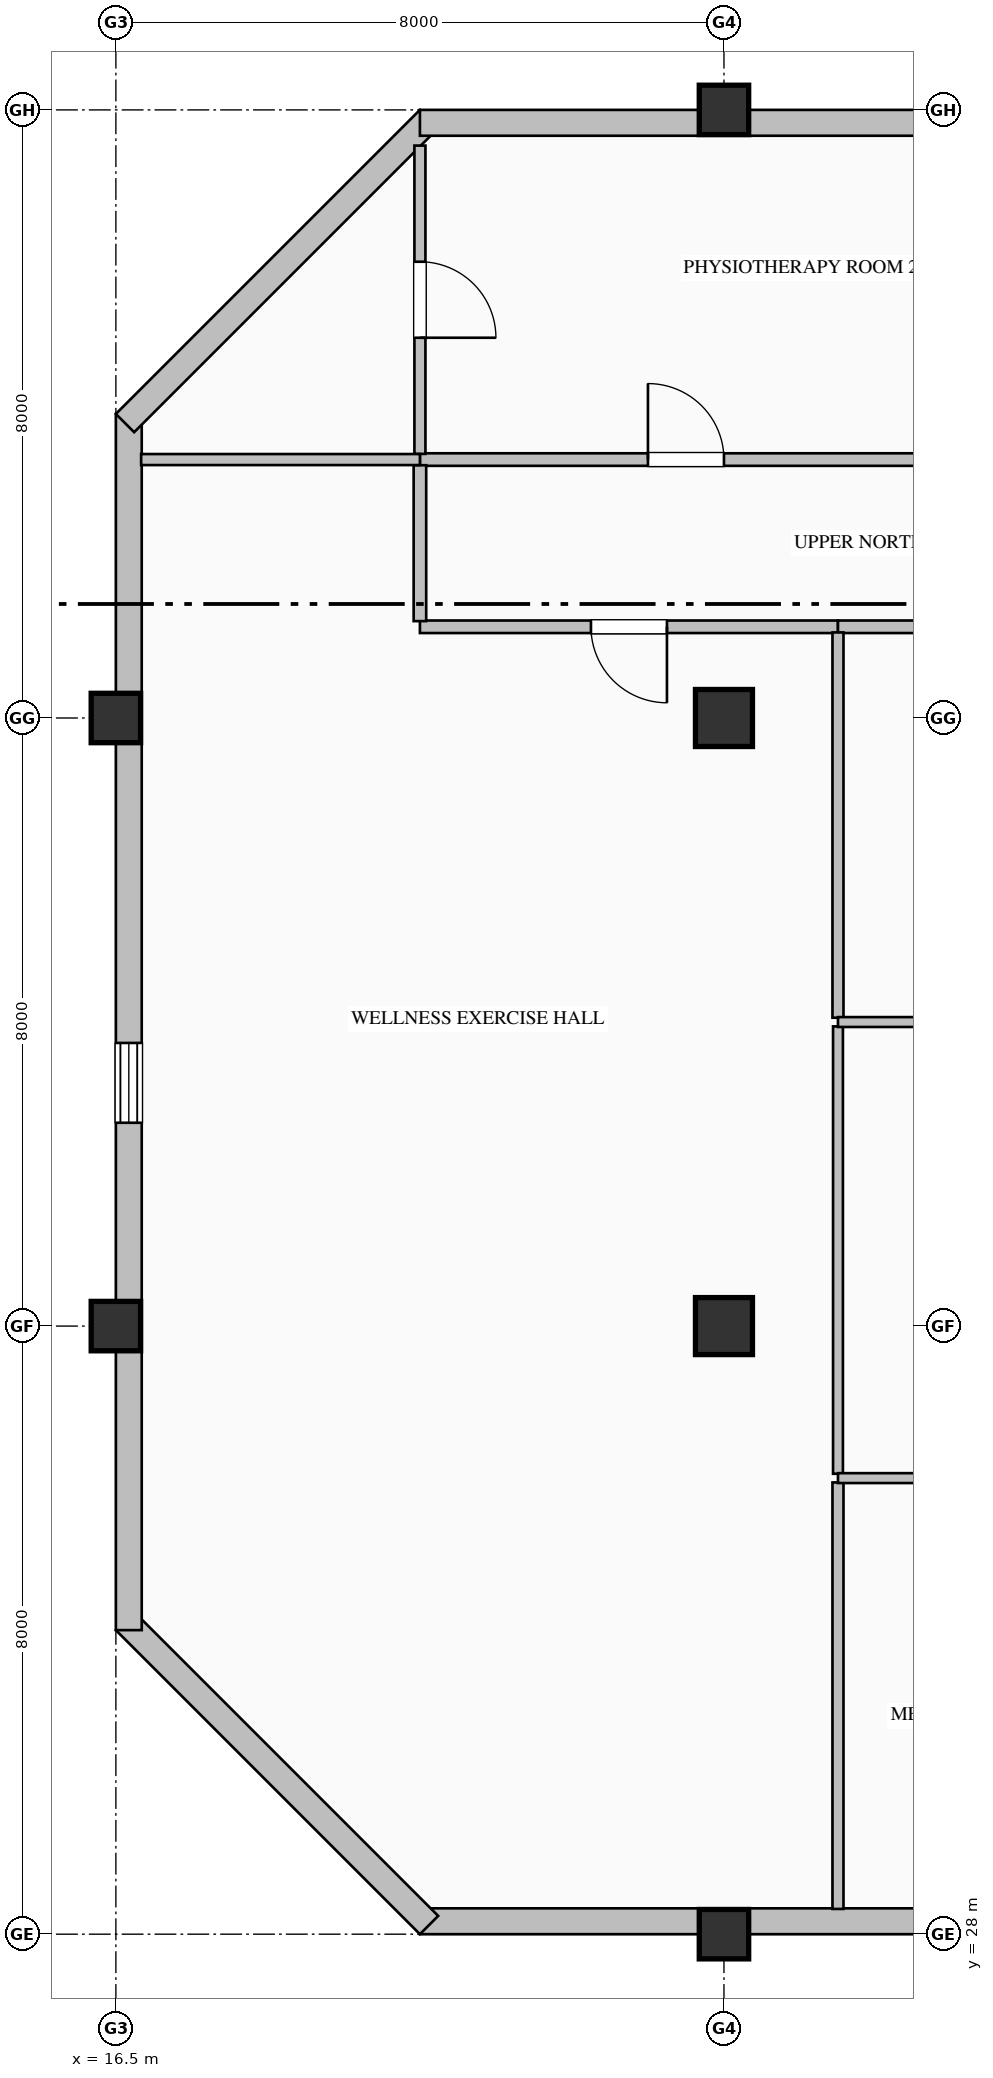
"""IFC4 building model, lengths in metres.
Left out: names, types, materials, properties, quantities, classifications, styles, units other than length and angle.
Written with IfcOpenShell. Run it as: python <this file> out.ifc"""

import sys

from ifc_helpers import new_model, si_unit, direction, frame, frame_2d, origin, origin_2d, place, context, subcontext, project, spatial, rectangle, hollow_rectangle, extrude, element, fill, save


model = new_model("IFC4")
c1 = context("Model", 3, precision=1e-05, world=origin(), true_north=direction((0.0, 1.0)))
c2 = subcontext(c1, "Body", "Model", "MODEL_VIEW")
j1 = project(units=[si_unit("LENGTHUNIT", "METRE"), si_unit("PLANEANGLEUNIT", "RADIAN")], contexts=[c1])
p1 = place(None, origin())
s1 = spatial("IfcSite", under=j1, at=p1, CompositionType="ELEMENT")
p2 = place(p1, origin())
s2 = spatial("IfcBuilding", under=s1, at=p2, CompositionType="ELEMENT")
p3 = place(p2, frame((0.0, 0.0, 347.2)))
s3 = spatial("IfcBuildingStorey", under=s2, at=p3, CompositionType="ELEMENT", Elevation=347.2)
for number, where, z_axis, x_axis in (
    (1, (16.5, 36.0, 0.0), (0.0, 0.0, 1.0), (1.0, 0.0, 0.0)),
    (2, (16.5, 44.0, 0.0), (0.0, 0.0, 1.0), (1.0, 0.0, 0.0)),
    (3, (24.5, 28.0, 0.0), (0.0, 0.0, 1.0), (1.0, 0.0, 0.0)),
):
    element("IfcColumn", number, at=place(p3, frame(where, z_axis=z_axis, x_axis=x_axis)), inside=s3, PredefinedType="COLUMN", context=c2, shape_type="SweptSolid", body=[
        extrude(hollow_rectangle(XDim=0.65, YDim=0.65, WallThickness=0.028, at=origin_2d()), origin(), (0.0, 0.0, 1.0), 4.0),
    ])
for number, where, z_axis, x_axis in (
    (4, (24.5, 36.0, 0.0), (0.0, 0.0, 1.0), (1.0, 0.0, 0.0)),
    (5, (24.5, 44.0, 0.0), (0.0, 0.0, 1.0), (1.0, 0.0, 0.0)),
):
    element("IfcColumn", number, at=place(p3, frame(where, z_axis=z_axis, x_axis=x_axis)), inside=s3, PredefinedType="COLUMN", context=c2, shape_type="SweptSolid", body=[
        extrude(rectangle(XDim=0.75, YDim=0.75, at=origin_2d()), origin(), (0.0, 0.0, 1.0), 4.0),
    ])
p4 = place(p3, frame((24.5, 52.0, 0.0), z_axis=(0.0, 0.0, 1.0), x_axis=(1.0, 0.0, 0.0)))
e6 = element("IfcColumn", 6, at=p4, inside=s3, PredefinedType="COLUMN", context=c2, shape_type="SweptSolid", body=[
    extrude(hollow_rectangle(XDim=0.65, YDim=0.65, WallThickness=0.028, at=origin_2d()), origin(), (0.0, 0.0, 1.0), 4.0),
])
p5 = place(p3, frame((40.52, 28.17, 0.0), z_axis=(0.0, 0.0, 1.0), x_axis=(-1.0, 0.0, 0.0)))
e7 = element("IfcWall", 7, at=p5, inside=s3, PredefinedType="SOLIDWALL", context=c2, shape_type="SweptSolid", body=[
    extrude(rectangle(XDim=20.02, YDim=0.34, at=frame_2d((10.01, 0.0))), origin(), (0.0, 0.0, 1.0), 3.185),
])
p6 = place(p5, frame((3.075, 0.0, 0.8)))
e8 = element("IfcOpeningElement", 8, at=p6, cuts=e7, PredefinedType="OPENING", context=c2, shape_type="SweptSolid", body=[
    extrude(rectangle(XDim=1.05, YDim=2.15, at=frame_2d((0.525, 1.075))), frame((0.0, 0.18, 0.0), z_axis=(0.0, -1.0, 0.0), x_axis=(1.0, 0.0, 0.0)), (0.0, 0.0, 1.0), 0.36),
])
p7 = place(p5, frame((10.325, 0.0, 0.9)))
e9 = element("IfcOpeningElement", 9, at=p7, cuts=e7, PredefinedType="OPENING", context=c2, shape_type="SweptSolid", body=[
    extrude(rectangle(XDim=0.95, YDim=1.85, at=frame_2d((0.475, 0.925))), frame((0.0, 0.18, 0.0), z_axis=(0.0, -1.0, 0.0), x_axis=(1.0, 0.0, 0.0)), (0.0, 0.0, 1.0), 0.36),
])
p8 = place(p3, frame((20.62, 28.12, 0.0), z_axis=(0.0, 0.0, 1.0), x_axis=(-0.707106781187, 0.707106781187, 0.0)))
e10 = element("IfcWall", 10, at=p8, inside=s3, PredefinedType="SOLIDWALL", context=c2, shape_type="SweptSolid", body=[
    extrude(rectangle(XDim=5.657, YDim=0.34, at=frame_2d((2.828, 0.0))), origin(), (0.0, 0.0, 1.0), 3.785),
])
p9 = place(p3, frame((16.67, 32.0, 0.0), z_axis=(0.0, 0.0, 1.0), x_axis=(0.0, 1.0, 0.0)))
e11 = element("IfcWall", 11, at=p9, inside=s3, PredefinedType="SOLIDWALL", context=c2, shape_type="SweptSolid", body=[
    extrude(rectangle(XDim=16.0, YDim=0.34, at=frame_2d((8.0, 0.0))), origin(), (0.0, 0.0, 1.0), 3.335),
])
p10 = place(p9, frame((6.675, 0.0, 0.8)))
e12 = element("IfcOpeningElement", 12, at=p10, cuts=e11, PredefinedType="OPENING", context=c2, shape_type="SweptSolid", body=[
    extrude(rectangle(XDim=1.05, YDim=2.15, at=frame_2d((0.525, 1.075))), frame((0.0, 0.18, 0.0), z_axis=(0.0, -1.0, 0.0), x_axis=(1.0, 0.0, 0.0)), (0.0, 0.0, 1.0), 0.36),
])
p11 = place(p3, frame((16.62, 47.88, 0.0), z_axis=(0.0, 0.0, 1.0), x_axis=(0.707106781187, 0.707106781187, 0.0)))
e13 = element("IfcWall", 13, at=p11, inside=s3, PredefinedType="SOLIDWALL", context=c2, shape_type="SweptSolid", body=[
    extrude(rectangle(XDim=5.657, YDim=0.34, at=frame_2d((2.828, 0.0))), origin(), (0.0, 0.0, 1.0), 3.785),
])
p12 = place(p3, frame((20.5, 51.83, 0.0), z_axis=(0.0, 0.0, 1.0), x_axis=(1.0, 0.0, 0.0)))
e14 = element("IfcWall", 14, at=p12, inside=s3, PredefinedType="SOLIDWALL", context=c2, shape_type="SweptSolid", body=[
    extrude(rectangle(XDim=20.02, YDim=0.34, at=frame_2d((10.01, 0.0))), origin(), (0.0, 0.0, 1.0), 3.335),
])
p13 = place(p3, frame((20.5, 47.4, 0.0), z_axis=(0.0, 0.0, 1.0), x_axis=(1.0, 0.0, 0.0)))
e15 = element("IfcWall", 15, at=p13, inside=s3, PredefinedType="PARTITIONING", context=c2, shape_type="SweptSolid", body=[
    extrude(rectangle(XDim=7.0, YDim=0.165, at=frame_2d((3.5, 0.0))), origin(), (0.0, 0.0, 1.0), 3.785),
])
p14 = place(p13, frame((3.0, 0.0, 0.0)))
e16 = element("IfcOpeningElement", 16, at=p14, cuts=e15, PredefinedType="OPENING", context=c2, shape_type="SweptSolid", body=[
    extrude(rectangle(XDim=1.0, YDim=2.15, at=frame_2d((0.5, 1.075))), frame((0.0, 0.093, 0.0), z_axis=(0.0, -1.0, 0.0), x_axis=(1.0, 0.0, 0.0)), (0.0, 0.0, 1.0), 0.185),
])
p15 = place(p3, frame((26.0, 45.2, 0.0), z_axis=(0.0, 0.0, 1.0), x_axis=(-1.0, 0.0, 0.0)))
e17 = element("IfcWall", 17, at=p15, inside=s3, PredefinedType="PARTITIONING", context=c2, shape_type="SweptSolid", body=[
    extrude(rectangle(XDim=5.5, YDim=0.165, at=frame_2d((2.75, 0.0))), origin(), (0.0, 0.0, 1.0), 3.785),
])
p16 = place(p15, frame((2.25, 0.0, 0.0)))
e18 = element("IfcOpeningElement", 18, at=p16, cuts=e17, PredefinedType="OPENING", context=c2, shape_type="SweptSolid", body=[
    extrude(rectangle(XDim=1.0, YDim=2.15, at=frame_2d((0.5, 1.075))), frame((0.0, 0.093, 0.0), z_axis=(0.0, -1.0, 0.0), x_axis=(1.0, 0.0, 0.0)), (0.0, 0.0, 1.0), 0.185),
])
p17 = place(p3, frame((20.5, 45.274, 0.0), z_axis=(0.0, 0.0, 1.0), x_axis=(0.0, 1.0, 0.0)))
e19 = element("IfcWall", 19, at=p17, inside=s3, PredefinedType="PARTITIONING", context=c2, shape_type="SweptSolid", body=[
    extrude(rectangle(XDim=2.051, YDim=0.165, at=frame_2d((1.025, 0.0))), origin(), (0.0, 0.0, 1.0), 3.785),
])
p18 = place(p3, frame((35.4, 45.2, 0.0), z_axis=(0.0, 0.0, 1.0), x_axis=(-1.0, 0.0, 0.0)))
e20 = element("IfcWall", 20, at=p18, inside=s3, PredefinedType="PARTITIONING", context=c2, shape_type="SweptSolid", body=[
    extrude(rectangle(XDim=9.4, YDim=0.165, at=frame_2d((4.7, 0.0))), origin(), (0.0, 0.0, 1.0), 3.785),
])
p19 = place(p18, frame((4.2, 0.0, 0.0)))
e21 = element("IfcOpeningElement", 21, at=p19, cuts=e20, PredefinedType="OPENING", context=c2, shape_type="SweptSolid", body=[
    extrude(rectangle(XDim=1.0, YDim=2.15, at=frame_2d((0.5, 1.075))), frame((0.0, 0.093, 0.0), z_axis=(0.0, -1.0, 0.0), x_axis=(1.0, 0.0, 0.0)), (0.0, 0.0, 1.0), 0.185),
])
p20 = place(p3, frame((20.5, 51.531, 0.0), z_axis=(0.0, 0.0, 1.0), x_axis=(0.0, -1.0, 0.0)))
e22 = element("IfcWall", 22, at=p20, inside=s3, PredefinedType="PARTITIONING", context=c2, shape_type="SweptSolid", body=[
    extrude(rectangle(XDim=4.056, YDim=0.145, at=frame_2d((2.028, 0.0))), origin(), (0.0, 0.0, 1.0), 3.785),
])
p21 = place(p20, frame((1.528, 0.0, 0.0)))
e23 = element("IfcOpeningElement", 23, at=p21, cuts=e22, PredefinedType="OPENING", context=c2, shape_type="SweptSolid", body=[
    extrude(rectangle(XDim=1.0, YDim=2.15, at=frame_2d((0.5, 1.075))), frame((0.0, 0.083, 0.0), z_axis=(0.0, -1.0, 0.0), x_axis=(1.0, 0.0, 0.0)), (0.0, 0.0, 1.0), 0.165),
])
p22 = place(p3, frame((20.5, 47.4, 0.0), z_axis=(0.0, 0.0, 1.0), x_axis=(-1.0, 0.0, 0.0)))
e24 = element("IfcWall", 24, at=p22, inside=s3, PredefinedType="PARTITIONING", context=c2, shape_type="SweptSolid", body=[
    extrude(rectangle(XDim=3.668, YDim=0.145, at=frame_2d((1.834, 0.0))), origin(), (0.0, 0.0, 1.0), 3.785),
])
p23 = place(p3, frame((26.0, 33.943, 0.0), z_axis=(0.0, 0.0, 1.0), x_axis=(0.0, -1.0, 0.0)))
e25 = element("IfcWall", 25, at=p23, inside=s3, PredefinedType="PARTITIONING", context=c2, shape_type="SweptSolid", body=[
    extrude(rectangle(XDim=5.611, YDim=0.145, at=frame_2d((2.806, 0.0))), origin(), (0.0, 0.0, 1.0), 3.785),
])
p24 = place(p3, frame((26.0, 39.943, 0.0), z_axis=(0.0, 0.0, 1.0), x_axis=(0.0, -1.0, 0.0)))
e26 = element("IfcWall", 26, at=p24, inside=s3, PredefinedType="PARTITIONING", context=c2, shape_type="SweptSolid", body=[
    extrude(rectangle(XDim=5.886, YDim=0.13, at=frame_2d((2.943, 0.0))), origin(), (0.0, 0.0, 1.0), 3.785),
])
p25 = place(p3, frame((26.0, 45.125, 0.0), z_axis=(0.0, 0.0, 1.0), x_axis=(0.0, -1.0, 0.0)))
e27 = element("IfcWall", 27, at=p25, inside=s3, PredefinedType="PARTITIONING", context=c2, shape_type="SweptSolid", body=[
    extrude(rectangle(XDim=5.069, YDim=0.145, at=frame_2d((2.534, 0.0))), origin(), (0.0, 0.0, 1.0), 3.785),
])
p26 = place(p3, frame((26.0, 34.0, 0.0), z_axis=(0.0, 0.0, 1.0), x_axis=(1.0, 0.0, 0.0)))
e28 = element("IfcWall", 28, at=p26, inside=s3, PredefinedType="PARTITIONING", context=c2, shape_type="SweptSolid", body=[
    extrude(rectangle(XDim=9.4, YDim=0.13, at=frame_2d((4.7, 0.0))), origin(), (0.0, 0.0, 1.0), 3.785),
])
p27 = place(p26, frame((4.2, 0.0, 0.0)))
e29 = element("IfcOpeningElement", 29, at=p27, cuts=e28, PredefinedType="OPENING", context=c2, shape_type="SweptSolid", body=[
    extrude(rectangle(XDim=1.0, YDim=2.15, at=frame_2d((0.5, 1.075))), frame((0.0, 0.075, 0.0), z_axis=(0.0, -1.0, 0.0), x_axis=(1.0, 0.0, 0.0)), (0.0, 0.0, 1.0), 0.15),
])
p28 = place(p3, frame((26.0, 40.0, 0.0), z_axis=(0.0, 0.0, 1.0), x_axis=(1.0, 0.0, 0.0)))
e30 = element("IfcWall", 30, at=p28, inside=s3, PredefinedType="PARTITIONING", context=c2, shape_type="SweptSolid", body=[
    extrude(rectangle(XDim=9.4, YDim=0.13, at=frame_2d((4.7, 0.0))), origin(), (0.0, 0.0, 1.0), 3.785),
])
p29 = place(p10, origin())
e31 = element("IfcWindow", 31, at=p29, inside=s3, PartitioningType="SINGLE_PANEL", PredefinedType="WINDOW", context=c2, shape_type="SweptSolid", body=[
    extrude(rectangle(XDim=1.05, YDim=2.15, at=frame_2d((0.525, 1.075))), frame((0.0, 0.15, 0.0), z_axis=(0.0, -1.0, 0.0), x_axis=(1.0, 0.0, 0.0)), (0.0, 0.0, 1.0), 0.06),
])
fill(e12, e31)
p30 = place(p21, origin())
e32 = element("IfcDoor", 32, at=p30, inside=s3, OperationType="SINGLE_SWING_RIGHT", PredefinedType="DOOR", context=c2, shape_type="SweptSolid", body=[
    extrude(rectangle(XDim=1.0, YDim=2.15, at=frame_2d((0.5, 1.075))), frame((0.0, 0.025, 0.0), z_axis=(0.0, -1.0, 0.0), x_axis=(1.0, 0.0, 0.0)), (0.0, 0.0, 1.0), 0.05),
])
fill(e23, e32)
p31 = place(p14, origin())
e33 = element("IfcDoor", 33, at=p31, inside=s3, OperationType="SINGLE_SWING_LEFT", PredefinedType="DOOR", context=c2, shape_type="SweptSolid", body=[
    extrude(rectangle(XDim=1.0, YDim=2.15, at=frame_2d((0.5, 1.075))), frame((0.0, 0.025, 0.0), z_axis=(0.0, -1.0, 0.0), x_axis=(1.0, 0.0, 0.0)), (0.0, 0.0, 1.0), 0.05),
])
fill(e16, e33)
p32 = place(p16, origin())
e34 = element("IfcDoor", 34, at=p32, inside=s3, OperationType="SINGLE_SWING_LEFT", PredefinedType="DOOR", context=c2, shape_type="SweptSolid", body=[
    extrude(rectangle(XDim=1.0, YDim=2.15, at=frame_2d((0.5, 1.075))), frame((0.0, 0.025, 0.0), z_axis=(0.0, -1.0, 0.0), x_axis=(1.0, 0.0, 0.0)), (0.0, 0.0, 1.0), 0.05),
])
fill(e18, e34)
save(model, sys.argv[1])
